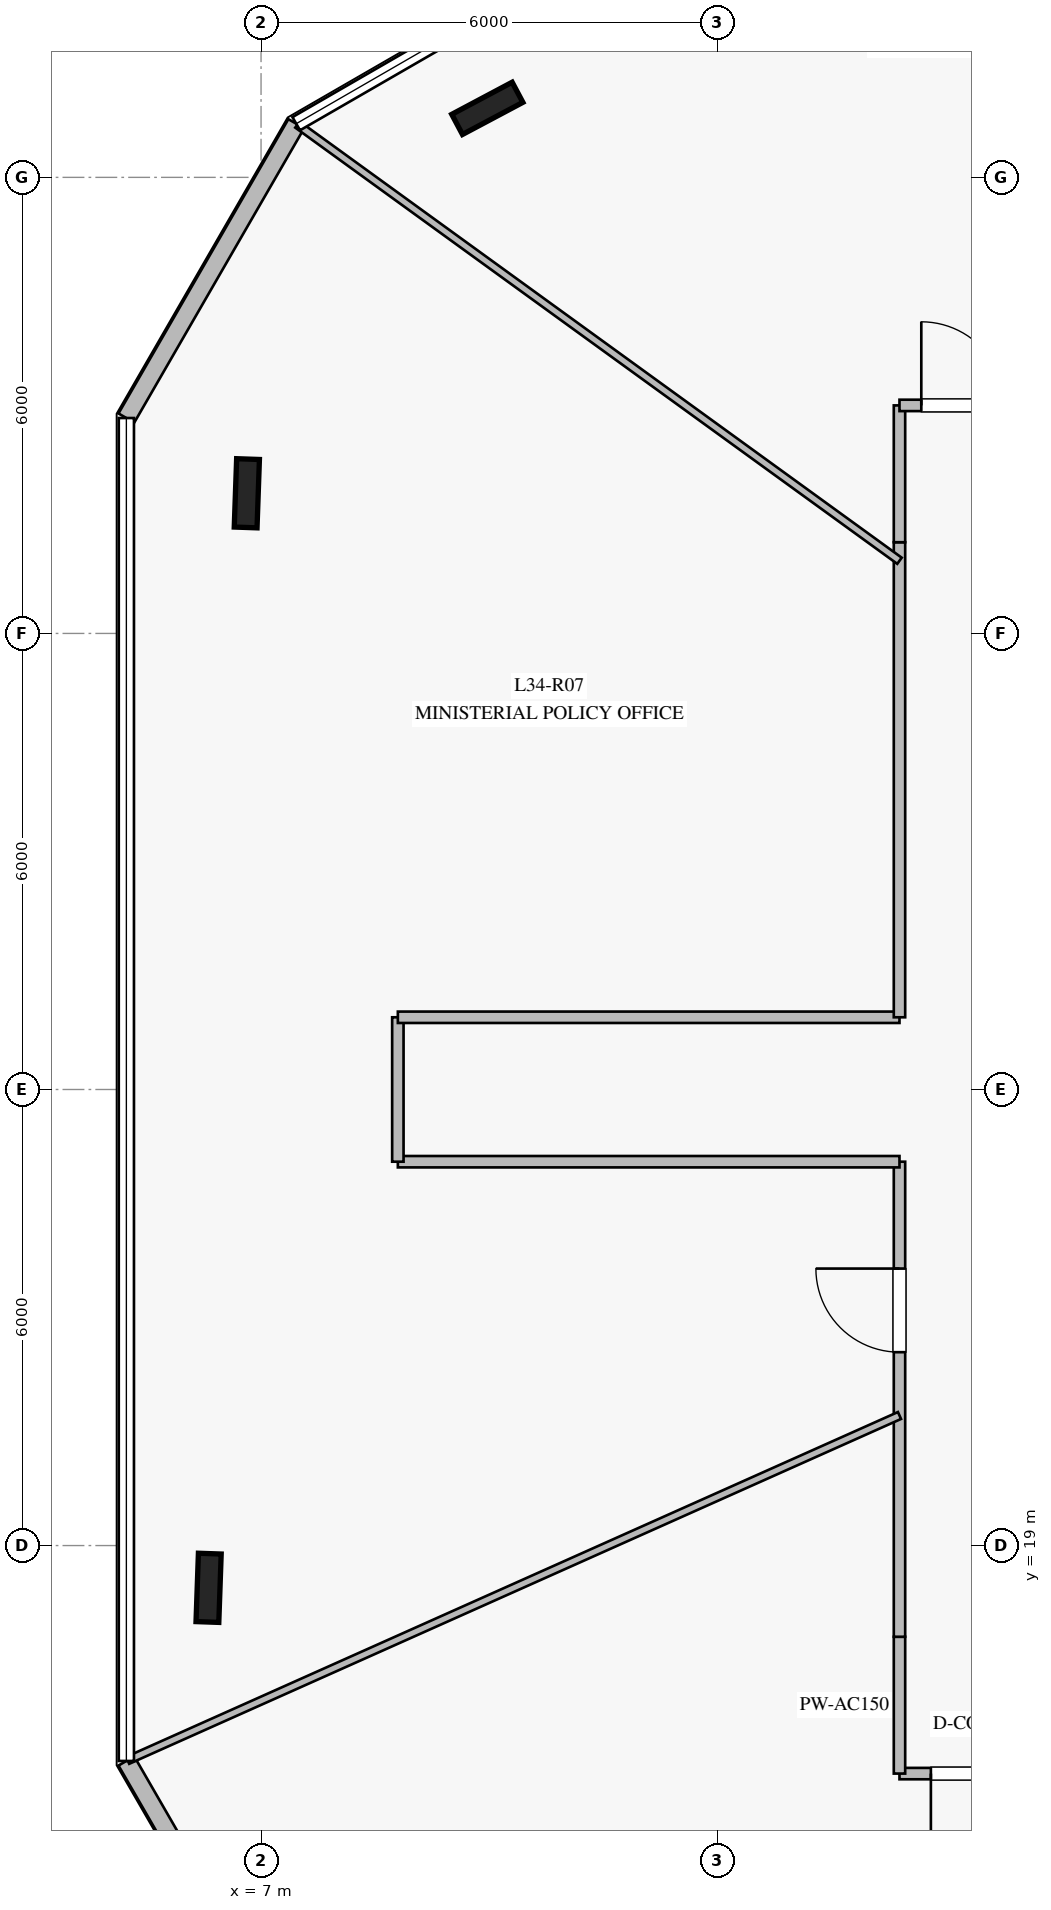
"""IFC4 building model, lengths in metres.
Left out: names, types, materials, properties, quantities, classifications, styles, units other than length and angle.
Written with IfcOpenShell. Run it as: python <this file> out.ifc"""

import sys

from ifc_helpers import new_model, si_unit, direction, frame, frame_2d, origin, origin_2d, place, context, subcontext, project, spatial, rectangle, i_section, extrude, element, fill, save


model = new_model("IFC4")
c1 = context("Model", 3, precision=1e-05, world=origin(), true_north=direction((0.0, 1.0)))
c2 = subcontext(c1, "Body", "Model", "MODEL_VIEW")
j1 = project(units=[si_unit("LENGTHUNIT", "METRE"), si_unit("PLANEANGLEUNIT", "RADIAN")], contexts=[c1])
p1 = place(None, origin())
s1 = spatial("IfcSite", under=j1, at=p1, CompositionType="ELEMENT")
p2 = place(p1, origin())
s2 = spatial("IfcBuilding", under=s1, at=p2, CompositionType="ELEMENT")
p3 = place(p2, frame((0.0, 0.0, 142.4)))
s3 = spatial("IfcBuildingStorey", under=s2, at=p3, CompositionType="ELEMENT", Elevation=142.4)
for number, where, z_axis, x_axis in (
    (1, (9.977, 37.908, 0.0), (0.0, 0.0, 1.0), (0.883, 0.469, 0.0)),
    (2, (6.813, 32.844, 0.0), (0.0, 0.0, 1.0), (0.035, 0.999, 0.0)),
    (3, (6.31, 18.444, 0.0), (0.0, 0.0, 1.0), (0.035, 0.999, 0.0)),
):
    element("IfcColumn", number, at=place(p3, frame(where, z_axis=z_axis, x_axis=x_axis)), inside=s3, PredefinedType="COLUMN", context=c2, shape_type="SweptSolid", body=[
        extrude(i_section(OverallWidth=0.3, OverallDepth=0.9, WebThickness=0.019, FlangeThickness=0.035, at=origin_2d()), origin(), (0.0, 0.0, 1.0), 4.0),
    ])
for number, where, z_axis, x_axis in (
    (4, (7.463, 37.706, 0.0), (0.0, 0.0, 1.0), (-0.5, -0.866, 0.0)),
    (5, (5.228, 16.166, 0.0), (0.0, 0.0, 1.0), (0.5, -0.866, 0.0)),
):
    element("IfcWall", number, at=place(p3, frame(where, z_axis=z_axis, x_axis=x_axis)), inside=s3, PredefinedType="STANDARD", context=c2, shape_type="SweptSolid", body=[
        extrude(rectangle(XDim=4.471, YDim=0.24, at=frame_2d((2.235, 0.0))), origin(), (0.0, 0.0, 1.0), 3.76),
    ])
p4 = place(p3, frame((17.2, 16.0, 0.0), z_axis=(0.0, 0.0, 1.0), x_axis=(-1.0, 0.0, 0.0)))
e6 = element("IfcWall", 6, at=p4, inside=s3, PredefinedType="PARTITIONING", context=c2, shape_type="SweptSolid", body=[
    extrude(rectangle(XDim=1.8, YDim=0.15, at=frame_2d((0.9, 0.0))), origin(), (0.0, 0.0, 1.0), 3.36),
])
p5 = place(p4, frame((0.287, 0.0, 0.0)))
e7 = element("IfcOpeningElement", 7, at=p5, cuts=e6, PredefinedType="OPENING", context=c2, shape_type="SweptSolid", body=[
    extrude(rectangle(XDim=1.1, YDim=2.2, at=frame_2d((0.55, 1.1))), frame((0.0, 0.085, 0.0), z_axis=(0.0, -1.0, 0.0), x_axis=(1.0, 0.0, 0.0)), (0.0, 0.0, 1.0), 0.17),
])
p6 = place(p3, frame((15.4, 16.0, 0.0), z_axis=(0.0, 0.0, 1.0), x_axis=(0.0, 1.0, 0.0)))
e8 = element("IfcWall", 8, at=p6, inside=s3, PredefinedType="PARTITIONING", context=c2, shape_type="SweptSolid", body=[
    extrude(rectangle(XDim=1.8, YDim=0.15, at=frame_2d((0.9, 0.0))), origin(), (0.0, 0.0, 1.0), 3.21),
])
p7 = place(p3, frame((15.4, 17.8, 0.0), z_axis=(0.0, 0.0, 1.0), x_axis=(0.0, 1.0, 0.0)))
e9 = element("IfcWall", 9, at=p7, inside=s3, PredefinedType="PARTITIONING", context=c2, shape_type="SweptSolid", body=[
    extrude(rectangle(XDim=6.25, YDim=0.15, at=frame_2d((3.125, 0.0))), origin(), (0.0, 0.0, 1.0), 3.21),
])
p8 = place(p7, frame((3.744, 0.0, 0.0)))
e10 = element("IfcOpeningElement", 10, at=p8, cuts=e9, PredefinedType="OPENING", context=c2, shape_type="SweptSolid", body=[
    extrude(rectangle(XDim=1.1, YDim=2.2, at=frame_2d((0.55, 1.1))), frame((0.0, 0.085, 0.0), z_axis=(0.0, -1.0, 0.0), x_axis=(1.0, 0.0, 0.0)), (0.0, 0.0, 1.0), 0.17),
])
p9 = place(p3, frame((15.4, 24.05, 0.0), z_axis=(0.0, 0.0, 1.0), x_axis=(-1.0, 0.0, 0.0)))
e11 = element("IfcWall", 11, at=p9, inside=s3, PredefinedType="PARTITIONING", context=c2, shape_type="SweptSolid", body=[
    extrude(rectangle(XDim=6.6, YDim=0.15, at=frame_2d((3.3, 0.0))), origin(), (0.0, 0.0, 1.0), 3.36),
])
p10 = place(p3, frame((8.8, 24.05, 0.0), z_axis=(0.0, 0.0, 1.0), x_axis=(0.0, 1.0, 0.0)))
e12 = element("IfcWall", 12, at=p10, inside=s3, PredefinedType="PARTITIONING", context=c2, shape_type="SweptSolid", body=[
    extrude(rectangle(XDim=1.9, YDim=0.15, at=frame_2d((0.95, 0.0))), origin(), (0.0, 0.0, 1.0), 3.76),
])
p11 = place(p3, frame((8.8, 25.95, 0.0), z_axis=(0.0, 0.0, 1.0), x_axis=(1.0, 0.0, 0.0)))
e13 = element("IfcWall", 13, at=p11, inside=s3, PredefinedType="PARTITIONING", context=c2, shape_type="SweptSolid", body=[
    extrude(rectangle(XDim=6.6, YDim=0.15, at=frame_2d((3.3, 0.0))), origin(), (0.0, 0.0, 1.0), 3.36),
])
p12 = place(p3, frame((15.4, 25.95, 0.0), z_axis=(0.0, 0.0, 1.0), x_axis=(0.0, 1.0, 0.0)))
e14 = element("IfcWall", 14, at=p12, inside=s3, PredefinedType="PARTITIONING", context=c2, shape_type="SweptSolid", body=[
    extrude(rectangle(XDim=6.25, YDim=0.15, at=frame_2d((3.125, 0.0))), origin(), (0.0, 0.0, 1.0), 3.21),
])
p13 = place(p3, frame((15.4, 32.2, 0.0), z_axis=(0.0, 0.0, 1.0), x_axis=(0.0, 1.0, 0.0)))
e15 = element("IfcWall", 15, at=p13, inside=s3, PredefinedType="PARTITIONING", context=c2, shape_type="SweptSolid", body=[
    extrude(rectangle(XDim=1.8, YDim=0.15, at=frame_2d((0.9, 0.0))), origin(), (0.0, 0.0, 1.0), 3.21),
])
p14 = place(p3, frame((15.4, 34.0, 0.0), z_axis=(0.0, 0.0, 1.0), x_axis=(1.0, 0.0, 0.0)))
e16 = element("IfcWall", 16, at=p14, inside=s3, PredefinedType="PARTITIONING", context=c2, shape_type="SweptSolid", body=[
    extrude(rectangle(XDim=1.8, YDim=0.15, at=frame_2d((0.9, 0.0))), origin(), (0.0, 0.0, 1.0), 3.76),
])
p15 = place(p14, frame((0.287, 0.0, 0.0)))
e17 = element("IfcOpeningElement", 17, at=p15, cuts=e16, PredefinedType="OPENING", context=c2, shape_type="SweptSolid", body=[
    extrude(rectangle(XDim=1.1, YDim=2.2, at=frame_2d((0.55, 1.1))), frame((0.0, 0.085, 0.0), z_axis=(0.0, -1.0, 0.0), x_axis=(1.0, 0.0, 0.0)), (0.0, 0.0, 1.0), 0.17),
])
p16 = place(p3, frame((15.4, 31.956, 0.0), z_axis=(0.0, 0.0, 1.0), x_axis=(-0.809787137788, 0.586723777832, 0.0)))
e18 = element("IfcWall", 18, at=p16, inside=s3, PredefinedType="MOVABLE", context=c2, shape_type="SweptSolid", body=[
    extrude(rectangle(XDim=9.781, YDim=0.1, at=frame_2d((4.891, 0.0))), origin(), (0.0, 0.0, 1.0), 3.16),
])
p17 = place(p3, frame((15.4, 20.711, 0.0), z_axis=(0.0, 0.0, 1.0), x_axis=(-0.913021408502, -0.407911641924, 0.0)))
e19 = element("IfcWall", 19, at=p17, inside=s3, PredefinedType="MOVABLE", context=c2, shape_type="SweptSolid", body=[
    extrude(rectangle(XDim=11.122, YDim=0.1, at=frame_2d((5.561, 0.0))), origin(), (0.0, 0.0, 1.0), 3.16),
])
p18 = place(p5, origin())
e20 = element("IfcDoor", 20, at=p18, inside=s3, OperationType="SINGLE_SWING_RIGHT", PredefinedType="DOOR", context=c2, shape_type="SweptSolid", body=[
    extrude(rectangle(XDim=1.1, YDim=2.2, at=frame_2d((0.55, 1.1))), frame((0.0, 0.025, 0.0), z_axis=(0.0, -1.0, 0.0), x_axis=(1.0, 0.0, 0.0)), (0.0, 0.0, 1.0), 0.05),
])
fill(e7, e20)
p19 = place(p15, origin())
e21 = element("IfcDoor", 21, at=p19, inside=s3, OperationType="SINGLE_SWING_LEFT", PredefinedType="DOOR", context=c2, shape_type="SweptSolid", body=[
    extrude(rectangle(XDim=1.1, YDim=2.2, at=frame_2d((0.55, 1.1))), frame((0.0, 0.025, 0.0), z_axis=(0.0, -1.0, 0.0), x_axis=(1.0, 0.0, 0.0)), (0.0, 0.0, 1.0), 0.05),
])
fill(e17, e21)
p20 = place(p8, origin())
e22 = element("IfcDoor", 22, at=p20, inside=s3, OperationType="SINGLE_SWING_RIGHT", PredefinedType="DOOR", context=c2, shape_type="SweptSolid", body=[
    extrude(rectangle(XDim=1.1, YDim=2.2, at=frame_2d((0.55, 1.1))), frame((0.0, 0.025, 0.0), z_axis=(0.0, -1.0, 0.0), x_axis=(1.0, 0.0, 0.0)), (0.0, 0.0, 1.0), 0.05),
])
fill(e10, e22)
save(model, sys.argv[1])
